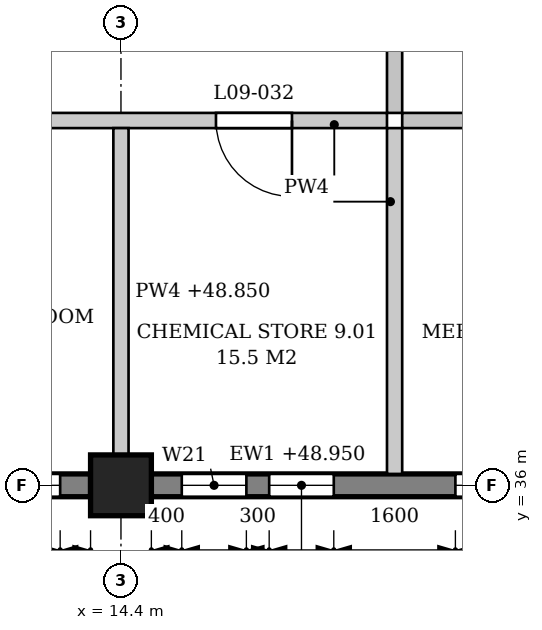
"""IFC4 building model, lengths in metres.
Left out: names, types, materials, properties, quantities, classifications, styles, units other than length and angle.
Written with IfcOpenShell. Run it as: python <this file> out.ifc"""

import sys

from ifc_helpers import new_model, si_unit, direction, frame, frame_2d, origin, origin_2d, place, context, subcontext, project, spatial, polyline, rectangle, outline, extrude, element, fill, save


model = new_model("IFC4")
c1 = context("Model", 3, precision=1e-05, world=origin(), true_north=direction((0.0, 1.0)))
c2 = subcontext(c1, "Body", "Model", "MODEL_VIEW")
j1 = project(units=[si_unit("LENGTHUNIT", "METRE"), si_unit("PLANEANGLEUNIT", "RADIAN")], contexts=[c1])
p1 = place(None, origin())
s1 = spatial("IfcSite", under=j1, at=p1, CompositionType="ELEMENT")
p2 = place(p1, origin())
s2 = spatial("IfcBuilding", under=s1, at=p2, CompositionType="ELEMENT")
p3 = place(p2, frame((0.0, 0.0, 45.3)))
s3 = spatial("IfcBuildingStorey", under=s2, at=p3, CompositionType="ELEMENT", Elevation=45.3)
p4 = place(p3, frame((14.4, 36.0, 0.0), z_axis=(0.0, 0.0, 1.0), x_axis=(1.0, 0.0, 0.0)))
e1 = element("IfcColumn", 1, at=p4, inside=s3, PredefinedType="COLUMN", context=c2, shape_type="SweptSolid", body=[
    extrude(rectangle(XDim=0.8, YDim=0.8, at=origin_2d()), origin(), (0.0, 0.0, 1.0), 4.5),
])
p5 = place(p3, frame((7.6, 36.0, 0.0), z_axis=(0.0, 0.0, 1.0), x_axis=(1.0, 0.0, 0.0)))
e2 = element("IfcWall", 2, at=p5, inside=s3, PredefinedType="STANDARD", context=c2, shape_type="SweptSolid", body=[
    extrude(rectangle(XDim=6.4, YDim=0.3, at=frame_2d((3.2, 0.0))), origin(), (0.0, 0.0, 1.0), 3.65),
])
p6 = place(p5, frame((0.4, 0.0, 0.9)))
e3 = element("IfcOpeningElement", 3, at=p6, cuts=e2, PredefinedType="OPENING", context=c2, shape_type="SweptSolid", body=[
    extrude(outline(polyline([(0.0, 0.0), (0.85, 0.0), (0.85, 2.25), (0.425, 2.7), (0.0, 2.25), (0.0, 0.0)])), frame((0.0, 0.16, 0.0), z_axis=(0.0, -1.0, 0.0), x_axis=(1.0, 0.0, 0.0)), (0.0, 0.0, 1.0), 0.32),
])
p7 = place(p5, frame((1.55, 0.0, 0.9)))
e4 = element("IfcOpeningElement", 4, at=p7, cuts=e2, PredefinedType="OPENING", context=c2, shape_type="SweptSolid", body=[
    extrude(outline(polyline([(0.0, 0.0), (0.85, 0.0), (0.85, 2.25), (0.425, 2.7), (0.0, 2.25), (0.0, 0.0)])), frame((0.0, 0.16, 0.0), z_axis=(0.0, -1.0, 0.0), x_axis=(1.0, 0.0, 0.0)), (0.0, 0.0, 1.0), 0.32),
])
p8 = place(p5, frame((4.0, 0.0, 0.9)))
e5 = element("IfcOpeningElement", 5, at=p8, cuts=e2, PredefinedType="OPENING", context=c2, shape_type="SweptSolid", body=[
    extrude(outline(polyline([(0.0, 0.0), (0.85, 0.0), (0.85, 2.25), (0.425, 2.7), (0.0, 2.25), (0.0, 0.0)])), frame((0.0, 0.16, 0.0), z_axis=(0.0, -1.0, 0.0), x_axis=(1.0, 0.0, 0.0)), (0.0, 0.0, 1.0), 0.32),
])
p9 = place(p5, frame((5.15, 0.0, 0.9)))
e6 = element("IfcOpeningElement", 6, at=p9, cuts=e2, PredefinedType="OPENING", context=c2, shape_type="SweptSolid", body=[
    extrude(outline(polyline([(0.0, 0.0), (0.85, 0.0), (0.85, 2.25), (0.425, 2.7), (0.0, 2.25), (0.0, 0.0)])), frame((0.0, 0.16, 0.0), z_axis=(0.0, -1.0, 0.0), x_axis=(1.0, 0.0, 0.0)), (0.0, 0.0, 1.0), 0.32),
])
p10 = place(p3, frame((14.8, 36.0, 0.0), z_axis=(0.0, 0.0, 1.0), x_axis=(1.0, 0.0, 0.0)))
e7 = element("IfcWall", 7, at=p10, inside=s3, PredefinedType="STANDARD", context=c2, shape_type="SweptSolid", body=[
    extrude(rectangle(XDim=6.4, YDim=0.3, at=frame_2d((3.2, 0.0))), origin(), (0.0, 0.0, 1.0), 3.65),
])
p11 = place(p10, frame((0.4, 0.0, 0.9)))
e8 = element("IfcOpeningElement", 8, at=p11, cuts=e7, PredefinedType="OPENING", context=c2, shape_type="SweptSolid", body=[
    extrude(outline(polyline([(0.0, 0.0), (0.85, 0.0), (0.85, 2.25), (0.425, 2.7), (0.0, 2.25), (0.0, 0.0)])), frame((0.0, 0.16, 0.0), z_axis=(0.0, -1.0, 0.0), x_axis=(1.0, 0.0, 0.0)), (0.0, 0.0, 1.0), 0.32),
])
p12 = place(p10, frame((1.55, 0.0, 0.9)))
e9 = element("IfcOpeningElement", 9, at=p12, cuts=e7, PredefinedType="OPENING", context=c2, shape_type="SweptSolid", body=[
    extrude(outline(polyline([(0.0, 0.0), (0.85, 0.0), (0.85, 2.25), (0.425, 2.7), (0.0, 2.25), (0.0, 0.0)])), frame((0.0, 0.16, 0.0), z_axis=(0.0, -1.0, 0.0), x_axis=(1.0, 0.0, 0.0)), (0.0, 0.0, 1.0), 0.32),
])
p13 = place(p10, frame((4.0, 0.0, 0.9)))
e10 = element("IfcOpeningElement", 10, at=p13, cuts=e7, PredefinedType="OPENING", context=c2, shape_type="SweptSolid", body=[
    extrude(outline(polyline([(0.0, 0.0), (0.85, 0.0), (0.85, 2.25), (0.425, 2.7), (0.0, 2.25), (0.0, 0.0)])), frame((0.0, 0.16, 0.0), z_axis=(0.0, -1.0, 0.0), x_axis=(1.0, 0.0, 0.0)), (0.0, 0.0, 1.0), 0.32),
])
p14 = place(p10, frame((5.15, 0.0, 0.9)))
e11 = element("IfcOpeningElement", 11, at=p14, cuts=e7, PredefinedType="OPENING", context=c2, shape_type="SweptSolid", body=[
    extrude(outline(polyline([(0.0, 0.0), (0.85, 0.0), (0.85, 2.25), (0.425, 2.7), (0.0, 2.25), (0.0, 0.0)])), frame((0.0, 0.16, 0.0), z_axis=(0.0, -1.0, 0.0), x_axis=(1.0, 0.0, 0.0)), (0.0, 0.0, 1.0), 0.32),
])
p15 = place(p3, frame((10.9, 40.8, 0.0), z_axis=(0.0, 0.0, 1.0), x_axis=(1.0, 0.0, 0.0)))
e12 = element("IfcWall", 12, at=p15, inside=s3, PredefinedType="PARTITIONING", context=c2, shape_type="SweptSolid", body=[
    extrude(outline(polyline([(0.0, 0.0), (7.0, 0.0), (7.0, 4.25), (3.725, 4.25), (3.725, 3.55), (3.275, 3.55), (3.275, 4.25), (0.0, 4.25), (0.0, 0.0)])), frame((0.0, 0.1, 0.0), z_axis=(0.0, -1.0, 0.0), x_axis=(1.0, 0.0, 0.0)), (0.0, 0.0, 1.0), 0.2),
])
p16 = place(p15, frame((1.25, 0.0, 0.0)))
e13 = element("IfcOpeningElement", 13, at=p16, cuts=e12, PredefinedType="OPENING", context=c2, shape_type="SweptSolid", body=[
    extrude(rectangle(XDim=1.0, YDim=2.1, at=frame_2d((0.5, 1.05))), frame((0.0, 0.11, 0.0), z_axis=(0.0, -1.0, 0.0), x_axis=(1.0, 0.0, 0.0)), (0.0, 0.0, 1.0), 0.22),
])
p17 = place(p15, frame((4.75, 0.0, 0.0)))
e14 = element("IfcOpeningElement", 14, at=p17, cuts=e12, PredefinedType="OPENING", context=c2, shape_type="SweptSolid", body=[
    extrude(rectangle(XDim=1.0, YDim=2.1, at=frame_2d((0.5, 1.05))), frame((0.0, 0.11, 0.0), z_axis=(0.0, -1.0, 0.0), x_axis=(1.0, 0.0, 0.0)), (0.0, 0.0, 1.0), 0.22),
])
p18 = place(p3, frame((18.1, 40.8, 0.0), z_axis=(0.0, 0.0, 1.0), x_axis=(1.0, 0.0, 0.0)))
e15 = element("IfcWall", 15, at=p18, inside=s3, PredefinedType="PARTITIONING", context=c2, shape_type="SweptSolid", body=[
    extrude(outline(polyline([(0.0, 0.0), (3.4, 0.0), (3.4, 3.55), (3.275, 3.55), (3.275, 4.25), (0.0, 4.25), (0.0, 0.0)])), frame((0.0, 0.1, 0.0), z_axis=(0.0, -1.0, 0.0), x_axis=(1.0, 0.0, 0.0)), (0.0, 0.0, 1.0), 0.2),
])
p19 = place(p18, frame((1.2, 0.0, 0.0)))
e16 = element("IfcOpeningElement", 16, at=p19, cuts=e15, PredefinedType="OPENING", context=c2, shape_type="SweptSolid", body=[
    extrude(rectangle(XDim=1.0, YDim=2.1, at=frame_2d((0.5, 1.05))), frame((0.0, 0.11, 0.0), z_axis=(0.0, -1.0, 0.0), x_axis=(1.0, 0.0, 0.0)), (0.0, 0.0, 1.0), 0.22),
])
p20 = place(p3, frame((14.4, 36.4, 0.0), z_axis=(0.0, 0.0, 1.0), x_axis=(0.0, 1.0, 0.0)))
e17 = element("IfcWall", 17, at=p20, inside=s3, PredefinedType="PARTITIONING", context=c2, shape_type="SweptSolid", body=[
    extrude(rectangle(XDim=4.3, YDim=0.2, at=frame_2d((2.15, 0.0))), origin(), (0.0, 0.0, 1.0), 3.55),
])
p21 = place(p3, frame((18.0, 36.15, 0.0), z_axis=(0.0, 0.0, 1.0), x_axis=(0.0, 1.0, 0.0)))
e18 = element("IfcWall", 18, at=p21, inside=s3, PredefinedType="PARTITIONING", context=c2, shape_type="SweptSolid", body=[
    extrude(outline(polyline([(0.0, 0.0), (4.55, 0.0), (4.55, 4.25), (0.05, 4.25), (0.05, 3.65), (0.0, 3.65), (0.0, 0.0)])), frame((0.0, 0.1, 0.0), z_axis=(0.0, -1.0, 0.0), x_axis=(1.0, 0.0, 0.0)), (0.0, 0.0, 1.0), 0.2),
])
p22 = place(p3, frame((18.0, 40.9, 0.0), z_axis=(0.0, 0.0, 1.0), x_axis=(0.0, 1.0, 0.0)))
e19 = element("IfcWall", 19, at=p22, inside=s3, PredefinedType="PARTITIONING", context=c2, shape_type="SweptSolid", body=[
    extrude(outline(polyline([(0.0, 0.0), (7.0, 0.0), (7.0, 4.25), (2.525, 4.25), (2.525, 3.55), (2.075, 3.55), (2.075, 4.25), (0.0, 4.25), (0.0, 0.0)])), frame((0.0, 0.1, 0.0), z_axis=(0.0, -1.0, 0.0), x_axis=(1.0, 0.0, 0.0)), (0.0, 0.0, 1.0), 0.2),
])
p23 = place(p22, frame((3.0, 0.0, 0.0)))
e20 = element("IfcOpeningElement", 20, at=p23, cuts=e19, PredefinedType="OPENING", context=c2, shape_type="SweptSolid", body=[
    extrude(rectangle(XDim=1.0, YDim=2.1, at=frame_2d((0.5, 1.05))), frame((0.0, 0.11, 0.0), z_axis=(0.0, -1.0, 0.0), x_axis=(1.0, 0.0, 0.0)), (0.0, 0.0, 1.0), 0.22),
])
p24 = place(p9, origin())
e21 = element("IfcWindow", 21, at=p24, inside=s3, PartitioningType="SINGLE_PANEL", PredefinedType="WINDOW", context=c2, shape_type="SweptSolid", body=[
    extrude(outline(polyline([(0.0, 0.0), (0.85, 0.0), (0.85, 2.25), (0.425, 2.7), (0.0, 2.25), (0.0, 0.0)])), frame((0.0, 0.03, 0.0), z_axis=(0.0, -1.0, 0.0), x_axis=(1.0, 0.0, 0.0)), (0.0, 0.0, 1.0), 0.06),
])
fill(e6, e21)
p25 = place(p11, origin())
e22 = element("IfcWindow", 22, at=p25, inside=s3, PartitioningType="SINGLE_PANEL", PredefinedType="WINDOW", context=c2, shape_type="SweptSolid", body=[
    extrude(outline(polyline([(0.0, 0.0), (0.85, 0.0), (0.85, 2.25), (0.425, 2.7), (0.0, 2.25), (0.0, 0.0)])), frame((0.0, 0.03, 0.0), z_axis=(0.0, -1.0, 0.0), x_axis=(1.0, 0.0, 0.0)), (0.0, 0.0, 1.0), 0.06),
])
fill(e8, e22)
p26 = place(p12, origin())
e23 = element("IfcWindow", 23, at=p26, inside=s3, PartitioningType="SINGLE_PANEL", PredefinedType="WINDOW", context=c2, shape_type="SweptSolid", body=[
    extrude(outline(polyline([(0.0, 0.0), (0.85, 0.0), (0.85, 2.25), (0.425, 2.7), (0.0, 2.25), (0.0, 0.0)])), frame((0.0, 0.03, 0.0), z_axis=(0.0, -1.0, 0.0), x_axis=(1.0, 0.0, 0.0)), (0.0, 0.0, 1.0), 0.06),
])
fill(e9, e23)
p27 = place(p13, origin())
e24 = element("IfcWindow", 24, at=p27, inside=s3, PartitioningType="SINGLE_PANEL", PredefinedType="WINDOW", context=c2, shape_type="SweptSolid", body=[
    extrude(outline(polyline([(0.0, 0.0), (0.85, 0.0), (0.85, 2.25), (0.425, 2.7), (0.0, 2.25), (0.0, 0.0)])), frame((0.0, 0.03, 0.0), z_axis=(0.0, -1.0, 0.0), x_axis=(1.0, 0.0, 0.0)), (0.0, 0.0, 1.0), 0.06),
])
fill(e10, e24)
p28 = place(p17, frame((1.0, 0.0, 0.0), z_axis=(0.0, 0.0, 1.0), x_axis=(-1.0, 0.0, 0.0)))
e25 = element("IfcDoor", 25, at=p28, inside=s3, OperationType="SINGLE_SWING_LEFT", PredefinedType="DOOR", context=c2, shape_type="SweptSolid", body=[
    extrude(rectangle(XDim=1.0, YDim=2.1, at=frame_2d((0.5, 1.05))), frame((0.0, 0.025, 0.0), z_axis=(0.0, -1.0, 0.0), x_axis=(1.0, 0.0, 0.0)), (0.0, 0.0, 1.0), 0.05),
])
fill(e14, e25)
save(model, sys.argv[1])
